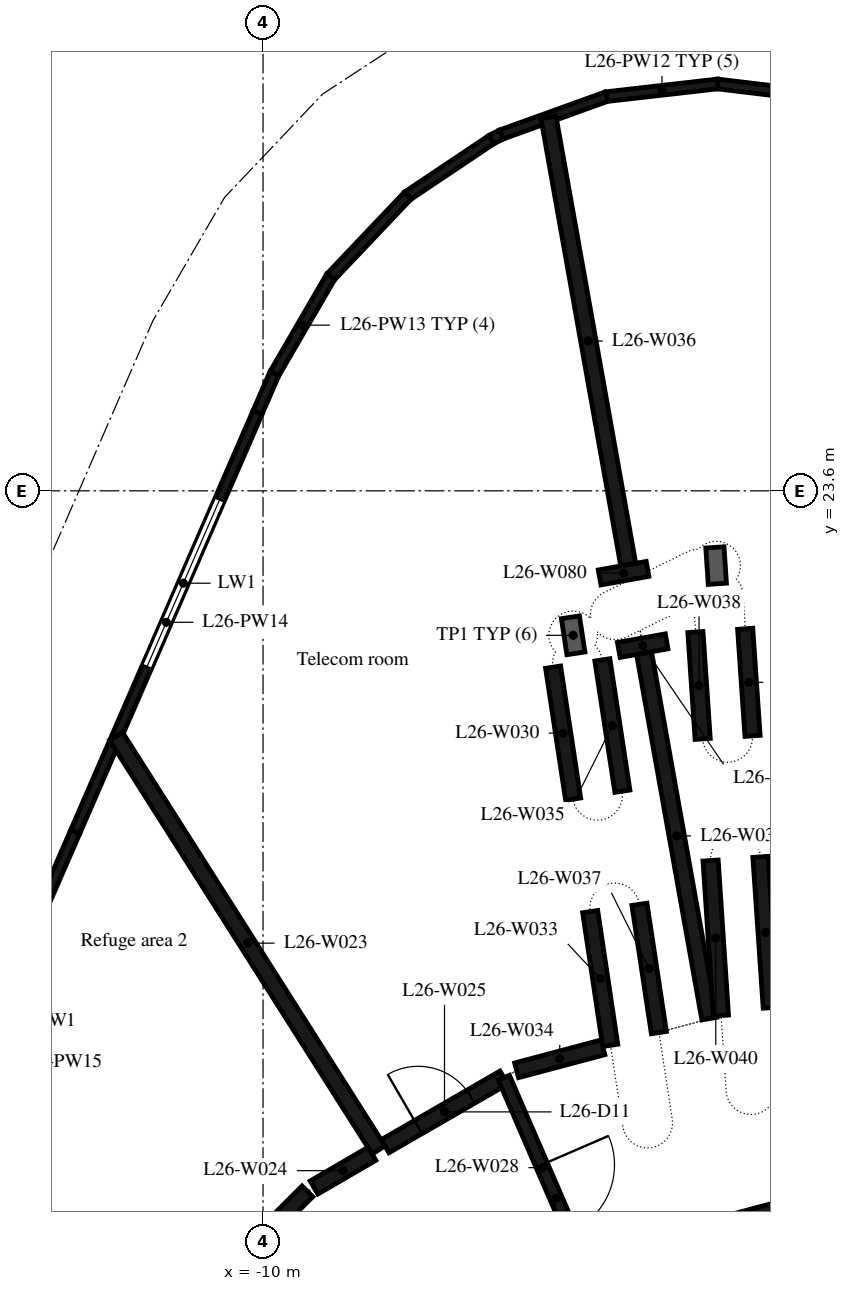
"""IFC4 building model, lengths in metres.
Left out: names, types, materials, properties, quantities, classifications, styles, units other than length and angle.
Written with IfcOpenShell. Run it as: python <this file> out.ifc"""

import sys

from ifc_helpers import new_model, si_unit, direction, frame, frame_2d, origin, place, context, subcontext, project, spatial, rectangle, extrude, element, fill, save


model = new_model("IFC4")
c1 = context("Model", 3, precision=1e-05, world=origin(), true_north=direction((0.0, 1.0)))
c2 = subcontext(c1, "Body", "Model", "MODEL_VIEW")
j1 = project(units=[si_unit("LENGTHUNIT", "METRE"), si_unit("PLANEANGLEUNIT", "RADIAN")], contexts=[c1])
p1 = place(None, origin())
s1 = spatial("IfcSite", under=j1, at=p1, CompositionType="ELEMENT")
p2 = place(p1, origin())
s2 = spatial("IfcBuilding", under=s1, at=p2, CompositionType="ELEMENT")
p3 = place(p2, frame((0.0, 0.0, 108.2)))
s3 = spatial("IfcBuildingStorey", under=s2, at=p3, CompositionType="ELEMENT", Elevation=108.2)
p4 = place(p3, frame((-0.697, 30.071, 0.0), z_axis=(0.0, 0.0, 1.0), x_axis=(-0.992909337367, 0.118874083672, 0.0)))
e1 = element("IfcWall", 1, at=p4, inside=s3, PredefinedType="STANDARD", context=c2, shape_type="SweptSolid", body=[
    extrude(rectangle(XDim=1.846, YDim=0.16, at=frame_2d((0.923, 0.0))), origin(), (0.0, 0.0, 1.0), 4.75),
])
p5 = place(p3, frame((-2.521, 30.291, 0.0), z_axis=(0.0, 0.0, 1.0), x_axis=(-0.99357220697, -0.113200130467, 0.0)))
e2 = element("IfcWall", 2, at=p5, inside=s3, PredefinedType="STANDARD", context=c2, shape_type="SweptSolid", body=[
    extrude(rectangle(XDim=1.848, YDim=0.16, at=frame_2d((0.924, 0.0))), origin(), (0.0, 0.0, 1.0), 4.75),
])
p6 = place(p3, frame((-4.348, 30.084, 0.0), z_axis=(0.0, 0.0, 1.0), x_axis=(-0.940678213267, -0.339300013388, 0.0)))
e3 = element("IfcWall", 3, at=p6, inside=s3, PredefinedType="STANDARD", context=c2, shape_type="SweptSolid", body=[
    extrude(rectangle(XDim=1.846, YDim=0.16, at=frame_2d((0.923, 0.0))), origin(), (0.0, 0.0, 1.0), 4.75),
])
p7 = place(p3, frame((-6.08, 29.459, 0.0), z_axis=(0.0, 0.0, 1.0), x_axis=(-0.889653469116, -0.456636293882, 0.0)))
e4 = element("IfcWall", 4, at=p7, inside=s3, PredefinedType="STANDARD", context=c2, shape_type="SweptSolid", body=[
    extrude(rectangle(XDim=0.186, YDim=0.16, at=frame_2d((0.093, 0.0))), origin(), (0.0, 0.0, 1.0), 4.75),
])
p8 = place(p3, frame((-6.246, 29.375, 0.0), z_axis=(0.0, 0.0, 1.0), x_axis=(-0.830691132327, -0.556733547285, 0.0)))
e5 = element("IfcWall", 5, at=p8, inside=s3, PredefinedType="STANDARD", context=c2, shape_type="SweptSolid", body=[
    extrude(rectangle(XDim=1.661, YDim=0.16, at=frame_2d((0.831, 0.0))), origin(), (0.0, 0.0, 1.0), 4.75),
])
p9 = place(p3, frame((-7.619, 28.455, 0.0), z_axis=(0.0, 0.0, 1.0), x_axis=(-0.688436911681, -0.725296228196, 0.0)))
e6 = element("IfcWall", 6, at=p9, inside=s3, PredefinedType="STANDARD", context=c2, shape_type="SweptSolid", body=[
    extrude(rectangle(XDim=1.848, YDim=0.16, at=frame_2d((0.924, 0.0))), origin(), (0.0, 0.0, 1.0), 4.75),
])
p10 = place(p3, frame((-8.885, 27.122, 0.0), z_axis=(0.0, 0.0, 1.0), x_axis=(-0.502464129555, -0.864598056041, 0.0)))
e7 = element("IfcWall", 7, at=p10, inside=s3, PredefinedType="STANDARD", context=c2, shape_type="SweptSolid", body=[
    extrude(rectangle(XDim=1.846, YDim=0.16, at=frame_2d((0.923, 0.0))), origin(), (0.0, 0.0, 1.0), 4.75),
])
p11 = place(p3, frame((-9.811, 25.531, 0.0), z_axis=(0.0, 0.0, 1.0), x_axis=(-0.398561214502, -0.917141732937, 0.0)))
e8 = element("IfcWall", 8, at=p11, inside=s3, PredefinedType="STANDARD", context=c2, shape_type="SweptSolid", body=[
    extrude(rectangle(XDim=0.704, YDim=0.16, at=frame_2d((0.352, 0.0))), origin(), (0.0, 0.0, 1.0), 4.75),
])
p12 = place(p3, frame((-10.092, 24.885, 0.0), z_axis=(0.0, 0.0, 1.0), x_axis=(-0.398765291981, -0.917053020229, 0.0)))
e9 = element("IfcWall", 9, at=p12, inside=s3, PredefinedType="STANDARD", context=c2, shape_type="SweptSolid", body=[
    extrude(rectangle(XDim=7.519, YDim=0.16, at=frame_2d((3.76, 0.0))), origin(), (0.0, 0.0, 1.0), 4.75),
])
p13 = place(p12, frame((1.558, 0.0, 1.0)))
e10 = element("IfcOpeningElement", 10, at=p13, cuts=e9, PredefinedType="OPENING", context=c2, shape_type="SweptSolid", body=[
    extrude(rectangle(XDim=3.0, YDim=2.2, at=frame_2d((1.5, 1.1))), frame((0.0, 0.09, 0.0), z_axis=(0.0, -1.0, 0.0), x_axis=(1.0, 0.0, 0.0)), (0.0, 0.0, 1.0), 0.18),
])
p14 = place(p3, frame((-13.09, 17.99, 0.0), z_axis=(0.0, 0.0, 1.0), x_axis=(-0.398749858314, -0.917059731149, 0.0)))
e11 = element("IfcWall", 11, at=p14, inside=s3, PredefinedType="STANDARD", context=c2, shape_type="SweptSolid", body=[
    extrude(rectangle(XDim=7.519, YDim=0.16, at=frame_2d((3.759, 0.0))), origin(), (0.0, 0.0, 1.0), 4.75),
])
p15 = place(p14, frame((2.26, 0.0, 1.0)))
e12 = element("IfcOpeningElement", 12, at=p15, cuts=e11, PredefinedType="OPENING", context=c2, shape_type="SweptSolid", body=[
    extrude(rectangle(XDim=3.0, YDim=2.2, at=frame_2d((1.5, 1.1))), frame((0.0, 0.09, 0.0), z_axis=(0.0, -1.0, 0.0), x_axis=(1.0, 0.0, 0.0)), (0.0, 0.0, 1.0), 0.18),
])
p16 = place(p3, frame((-1.55, 11.643, 0.0), z_axis=(0.0, 0.0, 1.0), x_axis=(-0.965948410781, -0.258734743916, 0.0)))
e13 = element("IfcWall", 13, at=p16, inside=s3, PredefinedType="SHEAR", context=c2, shape_type="SweptSolid", body=[
    extrude(rectangle(XDim=3.033, YDim=0.5, at=frame_2d((1.516, 0.0))), origin(), (0.0, 0.0, 1.0), 4.75),
])
p17 = place(p3, frame((-9.27, 12.08, 0.0), z_axis=(0.0, 0.0, 1.0), x_axis=(-0.707106781187, -0.707106781187, 0.0)))
e14 = element("IfcWall", 14, at=p17, inside=s3, PredefinedType="PARTITIONING", context=c2, shape_type="SweptSolid", body=[
    extrude(rectangle(XDim=3.849, YDim=0.25, at=frame_2d((1.925, 0.0))), origin(), (0.0, 0.0, 1.0), 4.75),
])
p18 = place(p17, frame((1.425, 0.0, 0.0)))
e15 = element("IfcOpeningElement", 15, at=p18, cuts=e14, PredefinedType="OPENING", context=c2, shape_type="SweptSolid", body=[
    extrude(rectangle(XDim=1.0, YDim=2.1, at=frame_2d((0.5, 1.05))), frame((0.0, 0.135, 0.0), z_axis=(0.0, -1.0, 0.0), x_axis=(1.0, 0.0, 0.0)), (0.0, 0.0, 1.0), 0.27),
])
p19 = place(p3, frame((-8.1, 12.76, 0.0), z_axis=(0.0, 0.0, 1.0), x_axis=(-0.535839810612, 0.844319665389, 0.0)))
e16 = element("IfcWall", 16, at=p19, inside=s3, PredefinedType="PARTITIONING", context=c2, shape_type="SweptSolid", body=[
    extrude(rectangle(XDim=8.057, YDim=0.25, at=frame_2d((4.028, 0.0))), origin(), (0.0, 0.0, 1.0), 4.75),
])
p20 = place(p3, frame((-8.208, 12.697, 0.0), z_axis=(0.0, 0.0, 1.0), x_axis=(-0.86455637663, -0.502535841138, 0.0)))
e17 = element("IfcWall", 17, at=p20, inside=s3, PredefinedType="PARTITIONING", context=c2, shape_type="SweptSolid", body=[
    extrude(rectangle(XDim=1.103, YDim=0.25, at=frame_2d((0.552, 0.0))), origin(), (0.0, 0.0, 1.0), 4.75),
])
p21 = place(p3, frame((-7.992, 12.823, 0.0), z_axis=(0.0, 0.0, 1.0), x_axis=(0.865900522319, 0.500216238688, 0.0)))
e18 = element("IfcWall", 18, at=p21, inside=s3, PredefinedType="PARTITIONING", context=c2, shape_type="SweptSolid", body=[
    extrude(rectangle(XDim=2.254, YDim=0.25, at=frame_2d((1.127, 0.0))), origin(), (0.0, 0.0, 1.0), 4.75),
])
p22 = place(p21, frame((0.627, 0.0, 0.0)))
e19 = element("IfcOpeningElement", 19, at=p22, cuts=e18, PredefinedType="OPENING", context=c2, shape_type="SweptSolid", body=[
    extrude(rectangle(XDim=1.0, YDim=2.1, at=frame_2d((0.5, 1.05))), frame((0.0, 0.135, 0.0), z_axis=(0.0, -1.0, 0.0), x_axis=(1.0, 0.0, 0.0)), (0.0, 0.0, 1.0), 0.27),
])
p23 = place(p3, frame((-6.04, 13.949, 0.0), z_axis=(0.0, 0.0, 1.0), x_axis=(0.396905977672, -0.917859272922, 0.0)))
e20 = element("IfcWall", 20, at=p23, inside=s3, PredefinedType="PARTITIONING", context=c2, shape_type="SweptSolid", body=[
    extrude(rectangle(XDim=3.224, YDim=0.2, at=frame_2d((1.612, 0.0))), origin(), (0.0, 0.0, 1.0), 4.75),
])
p24 = place(p23, frame((1.562, 0.0, 0.0)))
e21 = element("IfcOpeningElement", 21, at=p24, cuts=e20, PredefinedType="OPENING", context=c2, shape_type="SweptSolid", body=[
    extrude(rectangle(XDim=1.2, YDim=2.1, at=frame_2d((0.6, 1.05))), frame((0.0, 0.11, 0.0), z_axis=(0.0, -1.0, 0.0), x_axis=(1.0, 0.0, 0.0)), (0.0, 0.0, 1.0), 0.22),
])
p25 = place(p3, frame((-5.23, 20.7, 0.0), z_axis=(0.0, 0.0, 1.0), x_axis=(0.150385276272, -0.988627467088, 0.0)))
e22 = element("IfcWall", 22, at=p25, inside=s3, PredefinedType="PARTITIONING", context=c2, shape_type="SweptSolid", body=[
    extrude(rectangle(XDim=2.195, YDim=0.25, at=frame_2d((1.097, 0.0))), origin(), (0.0, 0.0, 1.0), 4.75),
])
p26 = place(p3, frame((-4.62, 16.68, 0.0), z_axis=(0.0, 0.0, 1.0), x_axis=(0.148378019052, -0.98893071722, 0.0)))
e23 = element("IfcWall", 23, at=p26, inside=s3, PredefinedType="PARTITIONING", context=c2, shape_type="SweptSolid", body=[
    extrude(rectangle(XDim=2.225, YDim=0.25, at=frame_2d((1.112, 0.0))), origin(), (0.0, 0.0, 1.0), 4.75),
])
p27 = place(p3, frame((-4.411, 14.448, 0.0), z_axis=(0.0, 0.0, 1.0), x_axis=(-0.966364499744, -0.257176308464, 0.0)))
e24 = element("IfcWall", 24, at=p27, inside=s3, PredefinedType="PARTITIONING", context=c2, shape_type="SweptSolid", body=[
    extrude(rectangle(XDim=1.469, YDim=0.25, at=frame_2d((0.734, 0.0))), origin(), (0.0, 0.0, 1.0), 4.75),
])
p28 = place(p3, frame((-4.09, 18.66, 0.0), z_axis=(0.0, 0.0, 1.0), x_axis=(-0.150940482968, 0.988542852183, 0.0)))
e25 = element("IfcWall", 25, at=p28, inside=s3, PredefinedType="PARTITIONING", context=c2, shape_type="SweptSolid", body=[
    extrude(rectangle(XDim=2.185, YDim=0.25, at=frame_2d((1.093, 0.0))), origin(), (0.0, 0.0, 1.0), 4.75),
])
p29 = place(p3, frame((-3.994, 22.386, 0.0), z_axis=(0.0, 0.0, 1.0), x_axis=(-0.17561193624, 0.984459469887, 0.0)))
e26 = element("IfcWall", 26, at=p29, inside=s3, PredefinedType="PARTITIONING", context=c2, shape_type="SweptSolid", body=[
    extrude(rectangle(XDim=7.471, YDim=0.25, at=frame_2d((3.736, 0.0))), origin(), (0.0, 0.0, 1.0), 4.75),
])
p30 = place(p3, frame((-3.49, 14.69, 0.0), z_axis=(0.0, 0.0, 1.0), x_axis=(-0.149968031865, 0.98869084623, 0.0)))
e27 = element("IfcWall", 27, at=p30, inside=s3, PredefinedType="PARTITIONING", context=c2, shape_type="SweptSolid", body=[
    extrude(rectangle(XDim=2.134, YDim=0.25, at=frame_2d((1.067, 0.0))), origin(), (0.0, 0.0, 1.0), 4.75),
])
p31 = place(p3, frame((-2.889, 21.278, 0.0), z_axis=(0.0, 0.0, 1.0), x_axis=(0.067769937047, -0.997700975058, 0.0)))
e28 = element("IfcWall", 28, at=p31, inside=s3, PredefinedType="PARTITIONING", context=c2, shape_type="SweptSolid", body=[
    extrude(rectangle(XDim=1.762, YDim=0.25, at=frame_2d((0.881, 0.0))), origin(), (0.0, 0.0, 1.0), 4.75),
])
p32 = place(p3, frame((-2.66, 14.92, 0.0), z_axis=(0.0, 0.0, 1.0), x_axis=(-0.175922099098, 0.984404091341, 0.0)))
e29 = element("IfcWall", 29, at=p32, inside=s3, PredefinedType="PARTITIONING", context=c2, shape_type="SweptSolid", body=[
    extrude(rectangle(XDim=6.106, YDim=0.25, at=frame_2d((3.053, 0.0))), origin(), (0.0, 0.0, 1.0), 4.75),
])
p33 = place(p3, frame((-2.64, 17.52, 0.0), z_axis=(0.0, 0.0, 1.0), x_axis=(0.066487308806, -0.997787270799, 0.0)))
e30 = element("IfcWall", 30, at=p33, inside=s3, PredefinedType="PARTITIONING", context=c2, shape_type="SweptSolid", body=[
    extrude(rectangle(XDim=2.556, YDim=0.25, at=frame_2d((1.278, 0.0))), origin(), (0.0, 0.0, 1.0), 4.75),
])
p34 = place(p3, frame((-1.95, 19.57, 0.0), z_axis=(0.0, 0.0, 1.0), x_axis=(-0.068455615556, 0.997654162873, 0.0)))
e31 = element("IfcWall", 31, at=p34, inside=s3, PredefinedType="PARTITIONING", context=c2, shape_type="SweptSolid", body=[
    extrude(rectangle(XDim=1.765, YDim=0.25, at=frame_2d((0.883, 0.0))), origin(), (0.0, 0.0, 1.0), 4.75),
])
p35 = place(p3, frame((-1.65, 15.1, 0.0), z_axis=(0.0, 0.0, 1.0), x_axis=(-0.06845491093, 0.997654211222, 0.0)))
e32 = element("IfcWall", 32, at=p35, inside=s3, PredefinedType="PARTITIONING", context=c2, shape_type="SweptSolid", body=[
    extrude(rectangle(XDim=2.486, YDim=0.25, at=frame_2d((1.243, 0.0))), origin(), (0.0, 0.0, 1.0), 4.75),
])
for number, where, z_axis, x_axis in (
    (33, (-4.464, 22.175, 0.0), (0.0, 0.0, 1.0), (0.984, 0.175, 0.0)),
    (34, (-3.362, 21.124, 0.0), (0.0, 0.0, 1.0), (-0.984, -0.176, 0.0)),
):
    element("IfcWall", number, at=place(p3, frame(where, z_axis=z_axis, x_axis=x_axis)), inside=s3, PredefinedType="PARTITIONING", context=c2, shape_type="SweptSolid", body=[
        extrude(rectangle(XDim=0.8, YDim=0.25, at=frame_2d((0.4, 0.0))), origin(), (0.0, 0.0, 1.0), 4.75),
    ])
p36 = place(p13, origin())
e35 = element("IfcWindow", 35, at=p36, inside=s3, PartitioningType="SINGLE_PANEL", PredefinedType="WINDOW", context=c2, shape_type="SweptSolid", body=[
    extrude(rectangle(XDim=3.0, YDim=2.2, at=frame_2d((1.5, 1.1))), frame((0.0, 0.03, 0.0), z_axis=(0.0, -1.0, 0.0), x_axis=(1.0, 0.0, 0.0)), (0.0, 0.0, 1.0), 0.06),
])
fill(e10, e35)
p37 = place(p22, origin())
e36 = element("IfcDoor", 36, at=p37, inside=s3, OperationType="SINGLE_SWING_LEFT", PredefinedType="DOOR", context=c2, shape_type="SweptSolid", body=[
    extrude(rectangle(XDim=1.0, YDim=2.1, at=frame_2d((0.5, 1.05))), frame((0.0, 0.025, 0.0), z_axis=(0.0, -1.0, 0.0), x_axis=(1.0, 0.0, 0.0)), (0.0, 0.0, 1.0), 0.05),
])
fill(e19, e36)
p38 = place(p24, origin())
e37 = element("IfcDoor", 37, at=p38, inside=s3, OperationType="SINGLE_SWING_LEFT", PredefinedType="DOOR", context=c2, shape_type="SweptSolid", body=[
    extrude(rectangle(XDim=1.2, YDim=2.1, at=frame_2d((0.6, 1.05))), frame((0.0, 0.025, 0.0), z_axis=(0.0, -1.0, 0.0), x_axis=(1.0, 0.0, 0.0)), (0.0, 0.0, 1.0), 0.05),
])
fill(e21, e37)
save(model, sys.argv[1])
